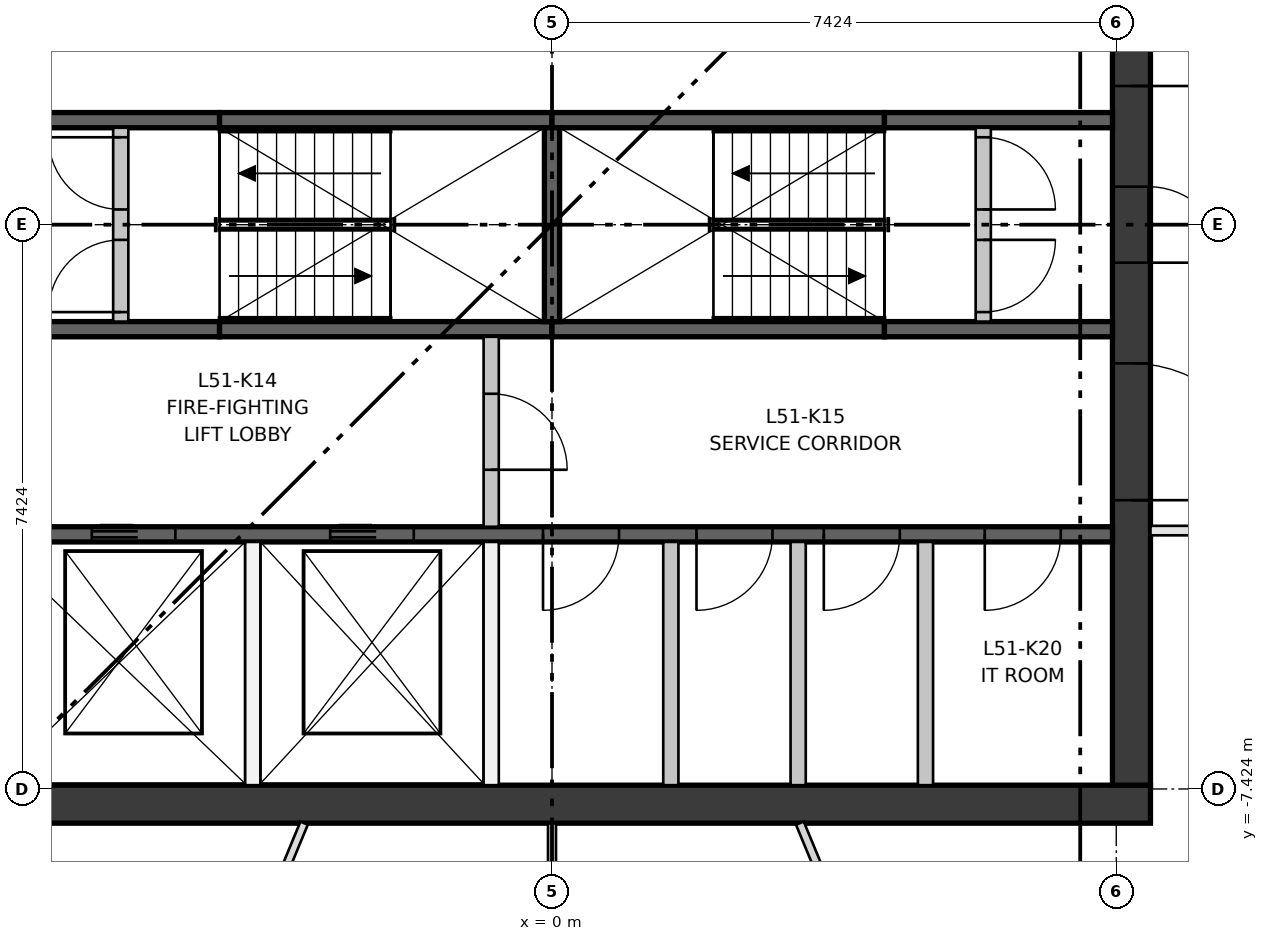
"""IFC4 building model, lengths in metres.
Left out: names, types, materials, properties, quantities, classifications, styles, units other than length and angle.
Written with IfcOpenShell. Run it as: python <this file> out.ifc"""

import sys

from ifc_helpers import new_model, si_unit, direction, frame, frame_2d, origin, place, context, subcontext, project, spatial, rectangle, extrude, element, fill, save


model = new_model("IFC4")
c1 = context("Model", 3, precision=1e-05, world=origin(), true_north=direction((0.0, 1.0)))
c2 = subcontext(c1, "Body", "Model", "MODEL_VIEW")
j1 = project(units=[si_unit("LENGTHUNIT", "METRE"), si_unit("PLANEANGLEUNIT", "RADIAN")], contexts=[c1])
p1 = place(None, origin())
s1 = spatial("IfcSite", under=j1, at=p1, CompositionType="ELEMENT")
p2 = place(p1, origin())
s2 = spatial("IfcBuilding", under=s1, at=p2, CompositionType="ELEMENT")
p3 = place(p2, frame((0.0, 0.0, 191.0)))
s3 = spatial("IfcBuildingStorey", under=s2, at=p3, CompositionType="ELEMENT", Elevation=191.0)
p4 = place(p3, frame((-7.874, -7.624, 0.0), z_axis=(0.0, 0.0, 1.0), x_axis=(1.0, 0.0, 0.0)))
e1 = element("IfcWall", 1, at=p4, inside=s3, PredefinedType="SHEAR", context=c2, shape_type="SweptSolid", body=[
    extrude(rectangle(XDim=15.748, YDim=0.5, at=frame_2d((7.874, 0.0))), origin(), (0.0, 0.0, 1.0), 3.35),
])
p5 = place(p3, frame((7.624, -7.374, 0.0), z_axis=(0.0, 0.0, 1.0), x_axis=(0.0, 1.0, 0.0)))
e2 = element("IfcWall", 2, at=p5, inside=s3, PredefinedType="SHEAR", context=c2, shape_type="SweptSolid", body=[
    extrude(rectangle(XDim=14.748, YDim=0.5, at=frame_2d((7.374, 0.0))), origin(), (0.0, 0.0, 1.0), 3.35),
])
p6 = place(p5, frame((6.874, 0.0, 0.0)))
e3 = element("IfcOpeningElement", 3, at=p6, cuts=e2, PredefinedType="OPENING", context=c2, shape_type="SweptSolid", body=[
    extrude(rectangle(XDim=1.0, YDim=2.1, at=frame_2d((0.5, 1.05))), frame((0.0, 0.26, 0.0), z_axis=(0.0, -1.0, 0.0), x_axis=(1.0, 0.0, 0.0)), (0.0, 0.0, 1.0), 0.52),
])
p7 = place(p5, frame((3.75, 0.0, 0.0)))
e4 = element("IfcOpeningElement", 4, at=p7, cuts=e2, PredefinedType="OPENING", context=c2, shape_type="SweptSolid", body=[
    extrude(rectangle(XDim=1.8, YDim=2.1, at=frame_2d((0.9, 1.05))), frame((0.0, 0.26, 0.0), z_axis=(0.0, -1.0, 0.0), x_axis=(1.0, 0.0, 0.0)), (0.0, 0.0, 1.0), 0.52),
])
p8 = place(p5, frame((9.198, 0.0, 0.0)))
e5 = element("IfcOpeningElement", 5, at=p8, cuts=e2, PredefinedType="OPENING", context=c2, shape_type="SweptSolid", body=[
    extrude(rectangle(XDim=1.8, YDim=2.1, at=frame_2d((0.9, 1.05))), frame((0.0, 0.26, 0.0), z_axis=(0.0, -1.0, 0.0), x_axis=(1.0, 0.0, 0.0)), (0.0, 0.0, 1.0), 0.52),
])
p9 = place(p3, frame((-7.374, -4.074, 0.0), z_axis=(0.0, 0.0, 1.0), x_axis=(1.0, 0.0, 0.0)))
e6 = element("IfcWall", 6, at=p9, inside=s3, PredefinedType="SHEAR", context=c2, shape_type="SweptSolid", body=[
    extrude(rectangle(XDim=14.748, YDim=0.2, at=frame_2d((7.374, 0.0))), origin(), (0.0, 0.0, 1.0), 3.0),
])
p10 = place(p9, frame((1.319, 0.0, 0.0)))
e7 = element("IfcOpeningElement", 7, at=p10, cuts=e6, PredefinedType="OPENING", context=c2, shape_type="SweptSolid", body=[
    extrude(rectangle(XDim=1.1, YDim=2.1, at=frame_2d((0.55, 1.05))), frame((0.0, 0.11, 0.0), z_axis=(0.0, -1.0, 0.0), x_axis=(1.0, 0.0, 0.0)), (0.0, 0.0, 1.0), 0.22),
])
p11 = place(p9, frame((4.456, 0.0, 0.0)))
e8 = element("IfcOpeningElement", 8, at=p11, cuts=e6, PredefinedType="OPENING", context=c2, shape_type="SweptSolid", body=[
    extrude(rectangle(XDim=1.1, YDim=2.1, at=frame_2d((0.55, 1.05))), frame((0.0, 0.11, 0.0), z_axis=(0.0, -1.0, 0.0), x_axis=(1.0, 0.0, 0.0)), (0.0, 0.0, 1.0), 0.22),
])
p12 = place(p9, frame((7.256, 0.0, 0.0)))
e9 = element("IfcOpeningElement", 9, at=p12, cuts=e6, PredefinedType="OPENING", context=c2, shape_type="SweptSolid", body=[
    extrude(rectangle(XDim=1.0, YDim=2.1, at=frame_2d((0.5, 1.05))), frame((0.0, 0.11, 0.0), z_axis=(0.0, -1.0, 0.0), x_axis=(1.0, 0.0, 0.0)), (0.0, 0.0, 1.0), 0.22),
])
p13 = place(p9, frame((9.275, 0.0, 0.0)))
e10 = element("IfcOpeningElement", 10, at=p13, cuts=e6, PredefinedType="OPENING", context=c2, shape_type="SweptSolid", body=[
    extrude(rectangle(XDim=1.0, YDim=2.1, at=frame_2d((0.5, 1.05))), frame((0.0, 0.11, 0.0), z_axis=(0.0, -1.0, 0.0), x_axis=(1.0, 0.0, 0.0)), (0.0, 0.0, 1.0), 0.22),
])
p14 = place(p9, frame((10.95, 0.0, 0.0)))
e11 = element("IfcOpeningElement", 11, at=p14, cuts=e6, PredefinedType="OPENING", context=c2, shape_type="SweptSolid", body=[
    extrude(rectangle(XDim=1.0, YDim=2.1, at=frame_2d((0.5, 1.05))), frame((0.0, 0.11, 0.0), z_axis=(0.0, -1.0, 0.0), x_axis=(1.0, 0.0, 0.0)), (0.0, 0.0, 1.0), 0.22),
])
p15 = place(p9, frame((13.068, 0.0, 0.0)))
e12 = element("IfcOpeningElement", 12, at=p15, cuts=e6, PredefinedType="OPENING", context=c2, shape_type="SweptSolid", body=[
    extrude(rectangle(XDim=1.0, YDim=2.1, at=frame_2d((0.5, 1.05))), frame((0.0, 0.11, 0.0), z_axis=(0.0, -1.0, 0.0), x_axis=(1.0, 0.0, 0.0)), (0.0, 0.0, 1.0), 0.22),
])
p16 = place(p3, frame((-7.374, -1.375, 0.0), z_axis=(0.0, 0.0, 1.0), x_axis=(1.0, 0.0, 0.0)))
e13 = element("IfcWall", 13, at=p16, inside=s3, PredefinedType="SHEAR", context=c2, shape_type="SweptSolid", body=[
    extrude(rectangle(XDim=3.0, YDim=0.2, at=frame_2d((1.5, 0.0))), origin(), (0.0, 0.0, 1.0), 3.0),
])
for number, where, z_axis, x_axis in (
    (14, (-4.374, -1.375, 0.0), (0.0, 0.0, 1.0), (1.0, 0.0, 0.0)),
    (15, (0.0, -1.375, 0.0), (0.0, 0.0, 1.0), (1.0, 0.0, 0.0)),
):
    element("IfcWall", number, at=place(p3, frame(where, z_axis=z_axis, x_axis=x_axis)), inside=s3, PredefinedType="SHEAR", context=c2, shape_type="SweptSolid", body=[
        extrude(rectangle(XDim=4.374, YDim=0.2, at=frame_2d((2.187, 0.0))), origin(), (0.0, 0.0, 1.0), 3.0),
    ])
for number, where, z_axis, x_axis in (
    (16, (4.374, -1.375, 0.0), (0.0, 0.0, 1.0), (1.0, 0.0, 0.0)),
    (17, (-7.374, 1.375, 0.0), (0.0, 0.0, 1.0), (1.0, 0.0, 0.0)),
):
    element("IfcWall", number, at=place(p3, frame(where, z_axis=z_axis, x_axis=x_axis)), inside=s3, PredefinedType="SHEAR", context=c2, shape_type="SweptSolid", body=[
        extrude(rectangle(XDim=3.0, YDim=0.2, at=frame_2d((1.5, 0.0))), origin(), (0.0, 0.0, 1.0), 3.0),
    ])
for number, where, z_axis, x_axis in (
    (18, (-4.374, 1.375, 0.0), (0.0, 0.0, 1.0), (1.0, 0.0, 0.0)),
    (19, (0.0, 1.375, 0.0), (0.0, 0.0, 1.0), (1.0, 0.0, 0.0)),
):
    element("IfcWall", number, at=place(p3, frame(where, z_axis=z_axis, x_axis=x_axis)), inside=s3, PredefinedType="SHEAR", context=c2, shape_type="SweptSolid", body=[
        extrude(rectangle(XDim=4.374, YDim=0.2, at=frame_2d((2.187, 0.0))), origin(), (0.0, 0.0, 1.0), 3.0),
    ])
p17 = place(p3, frame((4.374, 1.375, 0.0), z_axis=(0.0, 0.0, 1.0), x_axis=(1.0, 0.0, 0.0)))
e20 = element("IfcWall", 20, at=p17, inside=s3, PredefinedType="SHEAR", context=c2, shape_type="SweptSolid", body=[
    extrude(rectangle(XDim=3.0, YDim=0.2, at=frame_2d((1.5, 0.0))), origin(), (0.0, 0.0, 1.0), 3.0),
])
p18 = place(p3, frame((0.0, -1.275, 0.0), z_axis=(0.0, 0.0, 1.0), x_axis=(0.0, 1.0, 0.0)))
e21 = element("IfcWall", 21, at=p18, inside=s3, PredefinedType="SHEAR", context=c2, shape_type="SweptSolid", body=[
    extrude(rectangle(XDim=2.55, YDim=0.2, at=frame_2d((1.275, 0.0))), origin(), (0.0, 0.0, 1.0), 3.0),
])
for number, where, z_axis, x_axis in (
    (22, (-3.937, -7.374, 0.0), (0.0, 0.0, 1.0), (0.0, 1.0, 0.0)),
    (23, (-0.8, -7.374, 0.0), (0.0, 0.0, 1.0), (0.0, 1.0, 0.0)),
):
    element("IfcWall", number, at=place(p3, frame(where, z_axis=z_axis, x_axis=x_axis)), inside=s3, PredefinedType="PARTITIONING", context=c2, shape_type="SweptSolid", body=[
        extrude(rectangle(XDim=3.2, YDim=0.2, at=frame_2d((1.6, 0.0))), origin(), (0.0, 0.0, 1.0), 3.0),
    ])
p19 = place(p3, frame((-0.8, -3.974, 0.0), z_axis=(0.0, 0.0, 1.0), x_axis=(0.0, 1.0, 0.0)))
e24 = element("IfcWall", 24, at=p19, inside=s3, PredefinedType="PARTITIONING", context=c2, shape_type="SweptSolid", body=[
    extrude(rectangle(XDim=2.499, YDim=0.2, at=frame_2d((1.25, 0.0))), origin(), (0.0, 0.0, 1.0), 3.0),
])
p20 = place(p19, frame((0.75, 0.0, 0.0)))
e25 = element("IfcOpeningElement", 25, at=p20, cuts=e24, PredefinedType="OPENING", context=c2, shape_type="SweptSolid", body=[
    extrude(rectangle(XDim=1.0, YDim=2.1, at=frame_2d((0.5, 1.05))), frame((0.0, 0.11, 0.0), z_axis=(0.0, -1.0, 0.0), x_axis=(1.0, 0.0, 0.0)), (0.0, 0.0, 1.0), 0.22),
])
for number, where, z_axis, x_axis in (
    (26, (1.563, -7.374, 0.0), (0.0, 0.0, 1.0), (0.0, 1.0, 0.0)),
    (27, (3.239, -7.374, 0.0), (0.0, 0.0, 1.0), (0.0, 1.0, 0.0)),
    (28, (4.914, -7.374, 0.0), (0.0, 0.0, 1.0), (0.0, 1.0, 0.0)),
):
    element("IfcWall", number, at=place(p3, frame(where, z_axis=z_axis, x_axis=x_axis)), inside=s3, PredefinedType="PARTITIONING", context=c2, shape_type="SweptSolid", body=[
        extrude(rectangle(XDim=3.2, YDim=0.2, at=frame_2d((1.6, 0.0))), origin(), (0.0, 0.0, 1.0), 3.0),
    ])
p21 = place(p3, frame((-5.674, -1.275, 0.0), z_axis=(0.0, 0.0, 1.0), x_axis=(0.0, 1.0, 0.0)))
e29 = element("IfcWall", 29, at=p21, inside=s3, PredefinedType="PARTITIONING", context=c2, shape_type="SweptSolid", body=[
    extrude(rectangle(XDim=2.55, YDim=0.2, at=frame_2d((1.275, 0.0))), origin(), (0.0, 0.0, 1.0), 3.0),
])
p22 = place(p21, frame((0.125, 0.0, 0.0)))
e30 = element("IfcOpeningElement", 30, at=p22, cuts=e29, PredefinedType="OPENING", context=c2, shape_type="SweptSolid", body=[
    extrude(rectangle(XDim=0.95, YDim=2.1, at=frame_2d((0.475, 1.05))), frame((0.0, 0.11, 0.0), z_axis=(0.0, -1.0, 0.0), x_axis=(1.0, 0.0, 0.0)), (0.0, 0.0, 1.0), 0.22),
])
p23 = place(p21, frame((1.475, 0.0, 0.0)))
e31 = element("IfcOpeningElement", 31, at=p23, cuts=e29, PredefinedType="OPENING", context=c2, shape_type="SweptSolid", body=[
    extrude(rectangle(XDim=0.95, YDim=2.1, at=frame_2d((0.475, 1.05))), frame((0.0, 0.11, 0.0), z_axis=(0.0, -1.0, 0.0), x_axis=(1.0, 0.0, 0.0)), (0.0, 0.0, 1.0), 0.22),
])
p24 = place(p3, frame((5.674, -1.275, 0.0), z_axis=(0.0, 0.0, 1.0), x_axis=(0.0, 1.0, 0.0)))
e32 = element("IfcWall", 32, at=p24, inside=s3, PredefinedType="PARTITIONING", context=c2, shape_type="SweptSolid", body=[
    extrude(rectangle(XDim=2.55, YDim=0.2, at=frame_2d((1.275, 0.0))), origin(), (0.0, 0.0, 1.0), 3.0),
])
p25 = place(p24, frame((0.125, 0.0, 0.0)))
e33 = element("IfcOpeningElement", 33, at=p25, cuts=e32, PredefinedType="OPENING", context=c2, shape_type="SweptSolid", body=[
    extrude(rectangle(XDim=0.95, YDim=2.1, at=frame_2d((0.475, 1.05))), frame((0.0, 0.11, 0.0), z_axis=(0.0, -1.0, 0.0), x_axis=(1.0, 0.0, 0.0)), (0.0, 0.0, 1.0), 0.22),
])
p26 = place(p24, frame((1.475, 0.0, 0.0)))
e34 = element("IfcOpeningElement", 34, at=p26, cuts=e32, PredefinedType="OPENING", context=c2, shape_type="SweptSolid", body=[
    extrude(rectangle(XDim=0.95, YDim=2.1, at=frame_2d((0.475, 1.05))), frame((0.0, 0.11, 0.0), z_axis=(0.0, -1.0, 0.0), x_axis=(1.0, 0.0, 0.0)), (0.0, 0.0, 1.0), 0.22),
])
p27 = place(p3, frame((11.824, -4.024, 0.0), z_axis=(0.0, 0.0, 1.0), x_axis=(-1.0, 0.0, 0.0)))
e35 = element("IfcWall", 35, at=p27, inside=s3, PredefinedType="PARTITIONING", context=c2, shape_type="SweptSolid", body=[
    extrude(rectangle(XDim=3.95, YDim=0.125, at=frame_2d((1.975, 0.0))), origin(), (0.0, 0.0, 1.0), 3.0),
])
p28 = place(p27, frame((1.1, 0.0, 0.0)))
e36 = element("IfcOpeningElement", 36, at=p28, cuts=e35, PredefinedType="OPENING", context=c2, shape_type="SweptSolid", body=[
    extrude(rectangle(XDim=1.8, YDim=2.1, at=frame_2d((0.9, 1.05))), frame((0.0, 0.073, 0.0), z_axis=(0.0, -1.0, 0.0), x_axis=(1.0, 0.0, 0.0)), (0.0, 0.0, 1.0), 0.145),
])
p29 = place(p3, frame((-3.261, -7.874, 0.0), z_axis=(0.0, 0.0, 1.0), x_axis=(-0.382666229821, -0.923886657851, 0.0)))
e37 = element("IfcWall", 37, at=p29, inside=s3, PredefinedType="PARTITIONING", context=c2, shape_type="SweptSolid", body=[
    extrude(rectangle(XDim=3.977, YDim=0.105, at=frame_2d((1.989, 0.0))), origin(), (0.0, 0.0, 1.0), 3.0),
])
p30 = place(p29, frame((1.5, 0.0, 0.0)))
e38 = element("IfcOpeningElement", 38, at=p30, cuts=e37, PredefinedType="OPENING", context=c2, shape_type="SweptSolid", body=[
    extrude(rectangle(XDim=1.0, YDim=2.1, at=frame_2d((0.5, 1.05))), frame((0.0, 0.062, 0.0), z_axis=(0.0, -1.0, 0.0), x_axis=(1.0, 0.0, 0.0)), (0.0, 0.0, 1.0), 0.125),
])
p31 = place(p3, frame((0.0, -7.874, 0.0), z_axis=(0.0, 0.0, 1.0), x_axis=(0.0, -1.0, 0.0)))
e39 = element("IfcWall", 39, at=p31, inside=s3, PredefinedType="PARTITIONING", context=c2, shape_type="SweptSolid", body=[
    extrude(rectangle(XDim=4.57, YDim=0.105, at=frame_2d((2.285, 0.0))), origin(), (0.0, 0.0, 1.0), 3.0),
])
p32 = place(p3, frame((3.261, -7.874, 0.0), z_axis=(0.0, 0.0, 1.0), x_axis=(0.382666229821, -0.923886657851, 0.0)))
e40 = element("IfcWall", 40, at=p32, inside=s3, PredefinedType="PARTITIONING", context=c2, shape_type="SweptSolid", body=[
    extrude(rectangle(XDim=3.977, YDim=0.11, at=frame_2d((1.989, 0.0))), origin(), (0.0, 0.0, 1.0), 3.0),
])
p33 = place(p10, origin())
e41 = element("IfcDoor", 41, at=p33, inside=s3, OperationType="DOUBLE_DOOR_SLIDING", PredefinedType="DOOR", context=c2, shape_type="SweptSolid", body=[
    extrude(rectangle(XDim=1.1, YDim=2.1, at=frame_2d((0.55, 1.05))), frame((0.0, 0.025, 0.0), z_axis=(0.0, -1.0, 0.0), x_axis=(1.0, 0.0, 0.0)), (0.0, 0.0, 1.0), 0.05),
])
fill(e7, e41)
p34 = place(p11, origin())
e42 = element("IfcDoor", 42, at=p34, inside=s3, OperationType="DOUBLE_DOOR_SLIDING", PredefinedType="DOOR", context=c2, shape_type="SweptSolid", body=[
    extrude(rectangle(XDim=1.1, YDim=2.1, at=frame_2d((0.55, 1.05))), frame((0.0, 0.025, 0.0), z_axis=(0.0, -1.0, 0.0), x_axis=(1.0, 0.0, 0.0)), (0.0, 0.0, 1.0), 0.05),
])
fill(e8, e42)
p35 = place(p22, origin())
e43 = element("IfcDoor", 43, at=p35, inside=s3, OperationType="SINGLE_SWING_LEFT", PredefinedType="DOOR", context=c2, shape_type="SweptSolid", body=[
    extrude(rectangle(XDim=0.95, YDim=2.1, at=frame_2d((0.475, 1.05))), frame((0.0, 0.025, 0.0), z_axis=(0.0, -1.0, 0.0), x_axis=(1.0, 0.0, 0.0)), (0.0, 0.0, 1.0), 0.05),
])
fill(e30, e43)
p36 = place(p23, origin())
e44 = element("IfcDoor", 44, at=p36, inside=s3, OperationType="SINGLE_SWING_RIGHT", PredefinedType="DOOR", context=c2, shape_type="SweptSolid", body=[
    extrude(rectangle(XDim=0.95, YDim=2.1, at=frame_2d((0.475, 1.05))), frame((0.0, 0.025, 0.0), z_axis=(0.0, -1.0, 0.0), x_axis=(1.0, 0.0, 0.0)), (0.0, 0.0, 1.0), 0.05),
])
fill(e31, e44)
p37 = place(p25, frame((0.95, 0.0, 0.0), z_axis=(0.0, 0.0, 1.0), x_axis=(-1.0, 0.0, 0.0)))
e45 = element("IfcDoor", 45, at=p37, inside=s3, OperationType="SINGLE_SWING_RIGHT", PredefinedType="DOOR", context=c2, shape_type="SweptSolid", body=[
    extrude(rectangle(XDim=0.95, YDim=2.1, at=frame_2d((0.475, 1.05))), frame((0.0, 0.025, 0.0), z_axis=(0.0, -1.0, 0.0), x_axis=(1.0, 0.0, 0.0)), (0.0, 0.0, 1.0), 0.05),
])
fill(e33, e45)
p38 = place(p26, frame((0.95, 0.0, 0.0), z_axis=(0.0, 0.0, 1.0), x_axis=(-1.0, 0.0, 0.0)))
e46 = element("IfcDoor", 46, at=p38, inside=s3, OperationType="SINGLE_SWING_LEFT", PredefinedType="DOOR", context=c2, shape_type="SweptSolid", body=[
    extrude(rectangle(XDim=0.95, YDim=2.1, at=frame_2d((0.475, 1.05))), frame((0.0, 0.025, 0.0), z_axis=(0.0, -1.0, 0.0), x_axis=(1.0, 0.0, 0.0)), (0.0, 0.0, 1.0), 0.05),
])
fill(e34, e46)
p39 = place(p20, frame((1.0, 0.0, 0.0), z_axis=(0.0, 0.0, 1.0), x_axis=(-1.0, 0.0, 0.0)))
e47 = element("IfcDoor", 47, at=p39, inside=s3, OperationType="SINGLE_SWING_LEFT", PredefinedType="DOOR", context=c2, shape_type="SweptSolid", body=[
    extrude(rectangle(XDim=1.0, YDim=2.1, at=frame_2d((0.5, 1.05))), frame((0.0, 0.025, 0.0), z_axis=(0.0, -1.0, 0.0), x_axis=(1.0, 0.0, 0.0)), (0.0, 0.0, 1.0), 0.05),
])
fill(e25, e47)
p40 = place(p12, frame((1.0, 0.0, 0.0), z_axis=(0.0, 0.0, 1.0), x_axis=(-1.0, 0.0, 0.0)))
e48 = element("IfcDoor", 48, at=p40, inside=s3, OperationType="SINGLE_SWING_LEFT", PredefinedType="DOOR", context=c2, shape_type="SweptSolid", body=[
    extrude(rectangle(XDim=1.0, YDim=2.1, at=frame_2d((0.5, 1.05))), frame((0.0, 0.025, 0.0), z_axis=(0.0, -1.0, 0.0), x_axis=(1.0, 0.0, 0.0)), (0.0, 0.0, 1.0), 0.05),
])
fill(e9, e48)
p41 = place(p13, frame((1.0, 0.0, 0.0), z_axis=(0.0, 0.0, 1.0), x_axis=(-1.0, 0.0, 0.0)))
e49 = element("IfcDoor", 49, at=p41, inside=s3, OperationType="SINGLE_SWING_LEFT", PredefinedType="DOOR", context=c2, shape_type="SweptSolid", body=[
    extrude(rectangle(XDim=1.0, YDim=2.1, at=frame_2d((0.5, 1.05))), frame((0.0, 0.025, 0.0), z_axis=(0.0, -1.0, 0.0), x_axis=(1.0, 0.0, 0.0)), (0.0, 0.0, 1.0), 0.05),
])
fill(e10, e49)
p42 = place(p14, frame((1.0, 0.0, 0.0), z_axis=(0.0, 0.0, 1.0), x_axis=(-1.0, 0.0, 0.0)))
e50 = element("IfcDoor", 50, at=p42, inside=s3, OperationType="SINGLE_SWING_LEFT", PredefinedType="DOOR", context=c2, shape_type="SweptSolid", body=[
    extrude(rectangle(XDim=1.0, YDim=2.1, at=frame_2d((0.5, 1.05))), frame((0.0, 0.025, 0.0), z_axis=(0.0, -1.0, 0.0), x_axis=(1.0, 0.0, 0.0)), (0.0, 0.0, 1.0), 0.05),
])
fill(e11, e50)
p43 = place(p15, frame((1.0, 0.0, 0.0), z_axis=(0.0, 0.0, 1.0), x_axis=(-1.0, 0.0, 0.0)))
e51 = element("IfcDoor", 51, at=p43, inside=s3, OperationType="SINGLE_SWING_LEFT", PredefinedType="DOOR", context=c2, shape_type="SweptSolid", body=[
    extrude(rectangle(XDim=1.0, YDim=2.1, at=frame_2d((0.5, 1.05))), frame((0.0, 0.025, 0.0), z_axis=(0.0, -1.0, 0.0), x_axis=(1.0, 0.0, 0.0)), (0.0, 0.0, 1.0), 0.05),
])
fill(e12, e51)
p44 = place(p6, frame((1.0, 0.0, 0.0), z_axis=(0.0, 0.0, 1.0), x_axis=(-1.0, 0.0, 0.0)))
e52 = element("IfcDoor", 52, at=p44, inside=s3, OperationType="SINGLE_SWING_LEFT", PredefinedType="DOOR", context=c2, shape_type="SweptSolid", body=[
    extrude(rectangle(XDim=1.0, YDim=2.1, at=frame_2d((0.5, 1.05))), frame((0.0, 0.25, 0.0), z_axis=(0.0, -1.0, 0.0), x_axis=(1.0, 0.0, 0.0)), (0.0, 0.0, 1.0), 0.05),
])
fill(e3, e52)
p45 = place(p7, frame((1.8, 0.0, 0.0), z_axis=(0.0, 0.0, 1.0), x_axis=(-1.0, 0.0, 0.0)))
e53 = element("IfcDoor", 53, at=p45, inside=s3, OperationType="DOUBLE_DOOR_SINGLE_SWING", PredefinedType="DOOR", context=c2, shape_type="SweptSolid", body=[
    extrude(rectangle(XDim=1.8, YDim=2.1, at=frame_2d((0.9, 1.05))), frame((0.0, 0.025, 0.0), z_axis=(0.0, -1.0, 0.0), x_axis=(1.0, 0.0, 0.0)), (0.0, 0.0, 1.0), 0.05),
])
fill(e4, e53)
p46 = place(p8, frame((1.8, 0.0, 0.0), z_axis=(0.0, 0.0, 1.0), x_axis=(-1.0, 0.0, 0.0)))
e54 = element("IfcDoor", 54, at=p46, inside=s3, OperationType="DOUBLE_DOOR_SINGLE_SWING", PredefinedType="DOOR", context=c2, shape_type="SweptSolid", body=[
    extrude(rectangle(XDim=1.8, YDim=2.1, at=frame_2d((0.9, 1.05))), frame((0.0, 0.025, 0.0), z_axis=(0.0, -1.0, 0.0), x_axis=(1.0, 0.0, 0.0)), (0.0, 0.0, 1.0), 0.05),
])
fill(e5, e54)
save(model, sys.argv[1])
